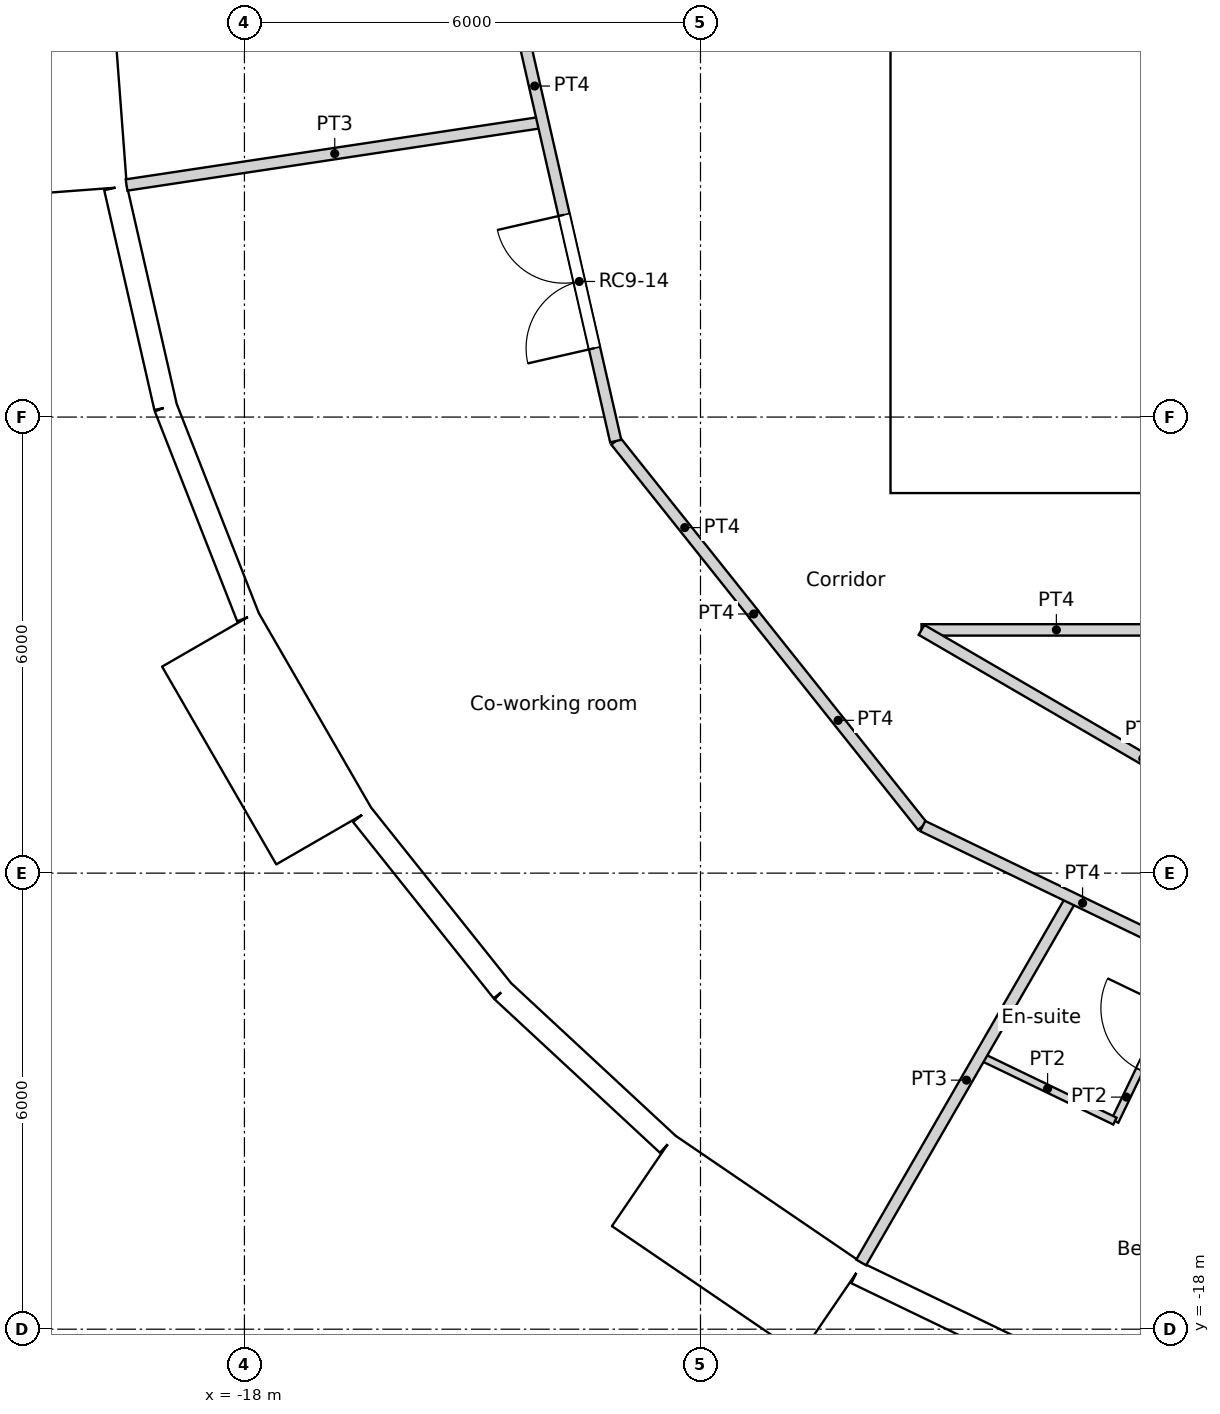
"""IFC4 building model, lengths in metres.
Left out: names, types, materials, properties, quantities, classifications, styles, units other than length and angle.
Written with IfcOpenShell. Run it as: python <this file> out.ifc"""

import sys

from ifc_helpers import new_model, si_unit, direction, frame, frame_2d, origin, origin_2d, place, context, subcontext, project, spatial, rectangle, circle, extrude, element, fill, save


model = new_model("IFC4")
c1 = context("Model", 3, precision=1e-05, world=origin(), true_north=direction((0.0, 1.0)))
c2 = subcontext(c1, "Body", "Model", "MODEL_VIEW")
j1 = project(units=[si_unit("LENGTHUNIT", "METRE"), si_unit("PLANEANGLEUNIT", "RADIAN")], contexts=[c1])
p1 = place(None, origin())
s1 = spatial("IfcSite", under=j1, at=p1, CompositionType="ELEMENT")
p2 = place(p1, origin())
s2 = spatial("IfcBuilding", under=s1, at=p2, CompositionType="ELEMENT")
p3 = place(p2, frame((0.0, 0.0, 316.2)))
s3 = spatial("IfcBuildingStorey", under=s2, at=p3, CompositionType="ELEMENT", Elevation=316.2)
for number, where, z_axis, x_axis in (
    (1, (-18.612, -2.805, 0.0), (0.0, 0.0, 1.0), (1.0, 0.0, 0.0)),
    (2, (-16.958, -8.167, 0.0), (0.0, 0.0, 1.0), (1.0, 0.0, 0.0)),
    (3, (-13.798, -12.802, 0.0), (0.0, 0.0, 1.0), (1.0, 0.0, 0.0)),
    (4, (-9.411, -16.301, 0.0), (0.0, 0.0, 1.0), (1.0, 0.0, 0.0)),
):
    element("IfcColumn", number, at=place(p3, frame(where, z_axis=z_axis, x_axis=x_axis)), inside=s3, PredefinedType="COLUMN", context=c2, shape_type="SweptSolid", body=[
        extrude(circle(Radius=0.45, at=origin_2d()), origin(), (0.0, 0.0, 1.0), 3.6),
    ])
p4 = place(p3, frame((-20.496, -0.032, -0.35), z_axis=(0.0, 0.0, 1.0), x_axis=(0.074785902127, -0.997199613339, 0.0)))
e5 = element("IfcWall", 5, at=p4, inside=s3, PredefinedType="ELEMENTEDWALL", context=c2, shape_type="SweptSolid", body=[
    extrude(rectangle(XDim=3.0, YDim=1.45, at=frame_2d((1.5, 0.0))), origin(), (0.0, 0.0, 1.0), 3.6),
])
p5 = place(p4, frame((1.5, 0.0, 1.9)))
e6 = element("IfcOpeningElement", 6, at=p5, cuts=e5, PredefinedType="OPENING", context=c2, shape_type="SweptSolid", body=[
    extrude(circle(Radius=0.9, at=origin_2d()), frame((0.0, 0.735, 0.0), z_axis=(0.0, -1.0, 0.0), x_axis=(1.0, 0.0, 0.0)), (0.0, 0.0, 1.0), 1.47),
])
p6 = place(p3, frame((-19.696, -2.984, 0.0), z_axis=(0.0, 0.0, 1.0), x_axis=(0.222529389789, -0.974925982155, 0.0)))
e7 = element("IfcWall", 7, at=p6, inside=s3, PredefinedType="SOLIDWALL", context=c2, shape_type="SweptSolid", body=[
    extrude(rectangle(XDim=2.962, YDim=0.3, at=frame_2d((1.481, 0.0))), origin(), (0.0, 0.0, 1.0), 3.25),
])
p7 = place(p6, frame((1.481, 0.0, 1.55)))
e8 = element("IfcOpeningElement", 8, at=p7, cuts=e7, PredefinedType="OPENING", context=c2, shape_type="SweptSolid", body=[
    extrude(circle(Radius=0.9, at=origin_2d()), frame((0.0, 0.16, 0.0), z_axis=(0.0, -1.0, 0.0), x_axis=(1.0, 0.0, 0.0)), (0.0, 0.0, 1.0), 0.32),
])
p8 = place(p3, frame((-19.037, -5.872, 0.0), z_axis=(0.0, 0.0, 1.0), x_axis=(0.36530043032, -0.930889679612, 0.0)))
e9 = element("IfcWall", 9, at=p8, inside=s3, PredefinedType="SOLIDWALL", context=c2, shape_type="SweptSolid", body=[
    extrude(rectangle(XDim=2.962, YDim=0.3, at=frame_2d((1.481, 0.0))), origin(), (0.0, 0.0, 1.0), 3.25),
])
p9 = place(p8, frame((1.481, 0.0, 1.55)))
e10 = element("IfcOpeningElement", 10, at=p9, cuts=e9, PredefinedType="OPENING", context=c2, shape_type="SweptSolid", body=[
    extrude(circle(Radius=0.9, at=origin_2d()), frame((0.0, 0.16, 0.0), z_axis=(0.0, -1.0, 0.0), x_axis=(1.0, 0.0, 0.0)), (0.0, 0.0, 1.0), 0.32),
])
p10 = place(p3, frame((-18.452, -8.921, -0.35), z_axis=(0.0, 0.0, 1.0), x_axis=(0.499990139034, -0.866031096941, 0.0)))
e11 = element("IfcWall", 11, at=p10, inside=s3, PredefinedType="ELEMENTEDWALL", context=c2, shape_type="SweptSolid", body=[
    extrude(rectangle(XDim=3.0, YDim=1.45, at=frame_2d((1.5, 0.0))), origin(), (0.0, 0.0, 1.0), 3.6),
])
p11 = place(p10, frame((1.5, 0.0, 1.9)))
e12 = element("IfcOpeningElement", 12, at=p11, cuts=e11, PredefinedType="OPENING", context=c2, shape_type="SweptSolid", body=[
    extrude(circle(Radius=0.9, at=origin_2d()), frame((0.0, 0.735, 0.0), z_axis=(0.0, -1.0, 0.0), x_axis=(1.0, 0.0, 0.0)), (0.0, 0.0, 1.0), 1.47),
])
p12 = place(p3, frame((-16.451, -11.234, 0.0), z_axis=(0.0, 0.0, 1.0), x_axis=(0.623498236992, -0.781824755599, 0.0)))
e13 = element("IfcWall", 13, at=p12, inside=s3, PredefinedType="SOLIDWALL", context=c2, shape_type="SweptSolid", body=[
    extrude(rectangle(XDim=2.962, YDim=0.3, at=frame_2d((1.481, 0.0))), origin(), (0.0, 0.0, 1.0), 3.25),
])
p13 = place(p12, frame((1.481, 0.0, 1.55)))
e14 = element("IfcOpeningElement", 14, at=p13, cuts=e13, PredefinedType="OPENING", context=c2, shape_type="SweptSolid", body=[
    extrude(circle(Radius=0.9, at=origin_2d()), frame((0.0, 0.16, 0.0), z_axis=(0.0, -1.0, 0.0), x_axis=(1.0, 0.0, 0.0)), (0.0, 0.0, 1.0), 0.32),
])
p14 = place(p3, frame((-14.604, -13.55, 0.0), z_axis=(0.0, 0.0, 1.0), x_axis=(0.733066412643, -0.680157066165, 0.0)))
e15 = element("IfcWall", 15, at=p14, inside=s3, PredefinedType="SOLIDWALL", context=c2, shape_type="SweptSolid", body=[
    extrude(rectangle(XDim=2.962, YDim=0.3, at=frame_2d((1.481, 0.0))), origin(), (0.0, 0.0, 1.0), 3.25),
])
p15 = place(p14, frame((1.481, 0.0, 1.55)))
e16 = element("IfcOpeningElement", 16, at=p15, cuts=e15, PredefinedType="OPENING", context=c2, shape_type="SweptSolid", body=[
    extrude(circle(Radius=0.9, at=origin_2d()), frame((0.0, 0.16, 0.0), z_axis=(0.0, -1.0, 0.0), x_axis=(1.0, 0.0, 0.0)), (0.0, 0.0, 1.0), 0.32),
])
p16 = place(p3, frame((-12.754, -16.044, -0.35), z_axis=(0.0, 0.0, 1.0), x_axis=(0.826246281157, -0.563309047392, 0.0)))
e17 = element("IfcWall", 17, at=p16, inside=s3, PredefinedType="ELEMENTEDWALL", context=c2, shape_type="SweptSolid", body=[
    extrude(rectangle(XDim=3.0, YDim=1.45, at=frame_2d((1.5, 0.0))), origin(), (0.0, 0.0, 1.0), 3.6),
])
p17 = place(p16, frame((1.5, 0.0, 1.9)))
e18 = element("IfcOpeningElement", 18, at=p17, cuts=e17, PredefinedType="OPENING", context=c2, shape_type="SweptSolid", body=[
    extrude(circle(Radius=0.9, at=origin_2d()), frame((0.0, 0.735, 0.0), z_axis=(0.0, -1.0, 0.0), x_axis=(1.0, 0.0, 0.0)), (0.0, 0.0, 1.0), 1.47),
])
p18 = place(p3, frame((-9.947, -17.259, 0.0), z_axis=(0.0, 0.0, 1.0), x_axis=(0.900939615635, -0.433944476838, 0.0)))
e19 = element("IfcWall", 19, at=p18, inside=s3, PredefinedType="SOLIDWALL", context=c2, shape_type="SweptSolid", body=[
    extrude(rectangle(XDim=2.962, YDim=0.3, at=frame_2d((1.481, 0.0))), origin(), (0.0, 0.0, 1.0), 3.25),
])
p19 = place(p18, frame((1.481, 0.0, 1.55)))
e20 = element("IfcOpeningElement", 20, at=p19, cuts=e19, PredefinedType="OPENING", context=c2, shape_type="SweptSolid", body=[
    extrude(circle(Radius=0.9, at=origin_2d()), frame((0.0, 0.16, 0.0), z_axis=(0.0, -1.0, 0.0), x_axis=(1.0, 0.0, 0.0)), (0.0, 0.0, 1.0), 0.32),
])
p20 = place(p3, frame((-9.5, -6.7, 0.0), z_axis=(0.0, 0.0, 1.0), x_axis=(1.0, 0.0, 0.0)))
e21 = element("IfcWall", 21, at=p20, inside=s3, PredefinedType="SOLIDWALL", context=c2, shape_type="SweptSolid", body=[
    extrude(rectangle(XDim=19.0, YDim=0.6, at=frame_2d((9.5, 0.0))), origin(), (0.0, 0.0, 1.0), 3.6),
])
p21 = place(p20, frame((10.4, 0.0, 0.0)))
e22 = element("IfcOpeningElement", 22, at=p21, cuts=e21, PredefinedType="OPENING", context=c2, shape_type="SweptSolid", body=[
    extrude(rectangle(XDim=1.0, YDim=2.1, at=frame_2d((0.5, 1.05))), frame((0.0, 0.3, 0.0), z_axis=(0.0, -1.0, 0.0), x_axis=(1.0, 0.0, 0.0)), (0.0, 0.0, 1.0), 0.6),
])
p22 = place(p20, frame((5.35, 0.0, 0.0)))
e23 = element("IfcOpeningElement", 23, at=p22, cuts=e21, PredefinedType="OPENING", context=c2, shape_type="SweptSolid", body=[
    extrude(rectangle(XDim=1.7, YDim=2.1, at=frame_2d((0.85, 1.05))), frame((0.0, 0.3, 0.0), z_axis=(0.0, -1.0, 0.0), x_axis=(1.0, 0.0, 0.0)), (0.0, 0.0, 1.0), 0.6),
])
p23 = place(p20, frame((11.95, 0.0, 0.0)))
e24 = element("IfcOpeningElement", 24, at=p23, cuts=e21, PredefinedType="OPENING", context=c2, shape_type="SweptSolid", body=[
    extrude(rectangle(XDim=1.7, YDim=2.1, at=frame_2d((0.85, 1.05))), frame((0.0, 0.3, 0.0), z_axis=(0.0, -1.0, 0.0), x_axis=(1.0, 0.0, 0.0)), (0.0, 0.0, 1.0), 0.6),
])
p24 = place(p3, frame((-9.2, -6.4, 0.0), z_axis=(0.0, 0.0, 1.0), x_axis=(0.0, 1.0, 0.0)))
e25 = element("IfcWall", 25, at=p24, inside=s3, PredefinedType="SOLIDWALL", context=c2, shape_type="SweptSolid", body=[
    extrude(rectangle(XDim=12.8, YDim=0.6, at=frame_2d((6.4, 0.0))), origin(), (0.0, 0.0, 1.0), 3.6),
])
p25 = place(p3, frame((-8.9, -3.1, 0.0), z_axis=(0.0, 0.0, 1.0), x_axis=(1.0, 0.0, 0.0)))
e26 = element("IfcWall", 26, at=p25, inside=s3, PredefinedType="SOLIDWALL", context=c2, shape_type="SweptSolid", body=[
    extrude(rectangle(XDim=9.6, YDim=0.3, at=frame_2d((4.8, 0.0))), origin(), (0.0, 0.0, 1.0), 3.25),
])
p26 = place(p25, frame((4.75, 0.0, 0.0)))
e27 = element("IfcOpeningElement", 27, at=p26, cuts=e26, PredefinedType="OPENING", context=c2, shape_type="SweptSolid", body=[
    extrude(rectangle(XDim=1.7, YDim=2.1, at=frame_2d((0.85, 1.05))), frame((0.0, 0.15, 0.0), z_axis=(0.0, -1.0, 0.0), x_axis=(1.0, 0.0, 0.0)), (0.0, 0.0, 1.0), 0.3),
])
p27 = place(p3, frame((-9.092, -8.8, 0.0), z_axis=(0.0, 0.0, 1.0), x_axis=(1.0, 0.0, 0.0)))
e28 = element("IfcWall", 28, at=p27, inside=s3, PredefinedType="PARTITIONING", context=c2, shape_type="SweptSolid", body=[
    extrude(rectangle(XDim=8.196, YDim=0.15, at=frame_2d((4.098, 0.0))), origin(), (0.0, 0.0, 1.0), 3.25),
])
p28 = place(p27, frame((3.598, 0.0, 0.0)))
e29 = element("IfcOpeningElement", 29, at=p28, cuts=e28, PredefinedType="OPENING", context=c2, shape_type="SweptSolid", body=[
    extrude(rectangle(XDim=1.0, YDim=2.04, at=frame_2d((0.5, 1.02))), frame((0.0, 0.075, 0.0), z_axis=(0.0, -1.0, 0.0), x_axis=(1.0, 0.0, 0.0)), (0.0, 0.0, 1.0), 0.15),
])
p29 = place(p3, frame((-9.092, -8.8, 0.0), z_axis=(0.0, 0.0, 1.0), x_axis=(0.864470922103, -0.502682827277, 0.0)))
e30 = element("IfcWall", 30, at=p29, inside=s3, PredefinedType="PARTITIONING", context=c2, shape_type="SweptSolid", body=[
    extrude(rectangle(XDim=6.735, YDim=0.15, at=frame_2d((3.368, 0.0))), origin(), (0.0, 0.0, 1.0), 3.25),
])
p30 = place(p3, frame((-11.3, -8.596, 0.0), z_axis=(0.0, 0.0, 1.0), x_axis=(0.623165080354, -0.782090328944, 0.0)))
e31 = element("IfcWall", 31, at=p30, inside=s3, PredefinedType="PARTITIONING", context=c2, shape_type="SweptSolid", body=[
    extrude(rectangle(XDim=3.564, YDim=0.15, at=frame_2d((1.782, 0.0))), origin(), (0.0, 0.0, 1.0), 3.25),
])
p31 = place(p3, frame((-11.3, -8.596, 0.0), z_axis=(0.0, 0.0, 1.0), x_axis=(0.0, 1.0, 0.0)))
e32 = element("IfcWall", 32, at=p31, inside=s3, PredefinedType="PARTITIONING", context=c2, shape_type="SweptSolid", body=[
    extrude(rectangle(XDim=0.011, YDim=0.15, at=frame_2d((0.006, 0.0))), origin(), (0.0, 0.0, 1.0), 3.25),
])
p32 = place(p3, frame((-14.557, 0.0, 0.0), z_axis=(0.0, 0.0, 1.0), x_axis=(0.222489165471, -0.974935162587, 0.0)))
e33 = element("IfcWall", 33, at=p32, inside=s3, PredefinedType="PARTITIONING", context=c2, shape_type="SweptSolid", body=[
    extrude(rectangle(XDim=6.479, YDim=0.15, at=frame_2d((3.239, 0.0))), origin(), (0.0, 0.0, 1.0), 3.25),
])
p33 = place(p32, frame((3.425, 0.0, 0.0)))
e34 = element("IfcOpeningElement", 34, at=p33, cuts=e33, PredefinedType="OPENING", context=c2, shape_type="SweptSolid", body=[
    extrude(rectangle(XDim=1.8, YDim=2.1, at=frame_2d((0.9, 1.05))), frame((0.0, 0.075, 0.0), z_axis=(0.0, -1.0, 0.0), x_axis=(1.0, 0.0, 0.0)), (0.0, 0.0, 1.0), 0.15),
])
p34 = place(p3, frame((-13.115, -6.316, 0.0), z_axis=(0.0, 0.0, 1.0), x_axis=(0.623446514299, -0.781866001185, 0.0)))
e35 = element("IfcWall", 35, at=p34, inside=s3, PredefinedType="PARTITIONING", context=c2, shape_type="SweptSolid", body=[
    extrude(rectangle(XDim=2.911, YDim=0.15, at=frame_2d((1.456, 0.0))), origin(), (0.0, 0.0, 1.0), 3.25),
])
p35 = place(p3, frame((-9.076, -11.381, 0.0), z_axis=(0.0, 0.0, 1.0), x_axis=(0.900851590682, -0.434127183629, 0.0)))
e36 = element("IfcWall", 36, at=p35, inside=s3, PredefinedType="PARTITIONING", context=c2, shape_type="SweptSolid", body=[
    extrude(rectangle(XDim=6.479, YDim=0.15, at=frame_2d((3.239, 0.0))), origin(), (0.0, 0.0, 1.0), 3.25),
])
p36 = place(p35, frame((4.719, 0.0, 0.0)))
e37 = element("IfcOpeningElement", 37, at=p36, cuts=e36, PredefinedType="OPENING", context=c2, shape_type="SweptSolid", body=[
    extrude(rectangle(XDim=1.0, YDim=2.1, at=frame_2d((0.5, 1.05))), frame((0.0, 0.075, 0.0), z_axis=(0.0, -1.0, 0.0), x_axis=(1.0, 0.0, 0.0)), (0.0, 0.0, 1.0), 0.15),
])
p37 = place(p3, frame((-19.551, -2.947, 0.0), z_axis=(0.0, 0.0, 1.0), x_axis=(0.988824228734, 0.149086031099, 0.0)))
e38 = element("IfcWall", 38, at=p37, inside=s3, PredefinedType="PARTITIONING", context=c2, shape_type="SweptSolid", body=[
    extrude(rectangle(XDim=5.54, YDim=0.15, at=frame_2d((2.77, 0.0))), origin(), (0.0, 0.0, 1.0), 3.25),
])
p38 = place(p3, frame((-9.886, -17.122, 0.0), z_axis=(0.0, 0.0, 1.0), x_axis=(0.500073446025, 0.865982995549, 0.0)))
e39 = element("IfcWall", 39, at=p38, inside=s3, PredefinedType="PARTITIONING", context=c2, shape_type="SweptSolid", body=[
    extrude(rectangle(XDim=5.539, YDim=0.15, at=frame_2d((2.77, 0.0))), origin(), (0.0, 0.0, 1.0), 3.25),
])
p39 = place(p3, frame((-8.319, -14.409, 0.0), z_axis=(0.0, 0.0, 1.0), x_axis=(0.900936932599, -0.433950047216, 0.0)))
e40 = element("IfcWall", 40, at=p39, inside=s3, PredefinedType="PARTITIONING", context=c2, shape_type="SweptSolid", body=[
    extrude(rectangle(XDim=1.966, YDim=0.1, at=frame_2d((0.983, 0.0))), origin(), (0.0, 0.0, 1.0), 3.25),
])
p40 = place(p3, frame((-6.548, -15.262, 0.0), z_axis=(0.0, 0.0, 1.0), x_axis=(0.433855388624, 0.900982520231, 0.0)))
e41 = element("IfcWall", 41, at=p40, inside=s3, PredefinedType="PARTITIONING", context=c2, shape_type="SweptSolid", body=[
    extrude(rectangle(XDim=2.399, YDim=0.1, at=frame_2d((1.2, 0.0))), origin(), (0.0, 0.0, 1.0), 3.25),
])
p41 = place(p40, frame((0.75, 0.0, 0.0)))
e42 = element("IfcOpeningElement", 42, at=p41, cuts=e41, PredefinedType="OPENING", context=c2, shape_type="SweptSolid", body=[
    extrude(rectangle(XDim=0.9, YDim=2.04, at=frame_2d((0.45, 1.02))), frame((0.0, 0.05, 0.0), z_axis=(0.0, -1.0, 0.0), x_axis=(1.0, 0.0, 0.0)), (0.0, 0.0, 1.0), 0.1),
])
p42 = place(p5, origin())
e43 = element("IfcWindow", 43, at=p42, inside=s3, PartitioningType="SINGLE_PANEL", PredefinedType="WINDOW", context=c2, shape_type="SweptSolid", body=[
    extrude(circle(Radius=0.9, at=origin_2d()), frame((0.0, 0.695, 0.0), z_axis=(0.0, -1.0, 0.0), x_axis=(1.0, 0.0, 0.0)), (0.0, 0.0, 1.0), 0.1),
])
fill(e6, e43)
p43 = place(p7, origin())
e44 = element("IfcWindow", 44, at=p43, inside=s3, PartitioningType="SINGLE_PANEL", PredefinedType="WINDOW", context=c2, shape_type="SweptSolid", body=[
    extrude(circle(Radius=0.9, at=origin_2d()), frame((0.0, 0.12, 0.0), z_axis=(0.0, -1.0, 0.0), x_axis=(1.0, 0.0, 0.0)), (0.0, 0.0, 1.0), 0.1),
])
fill(e8, e44)
p44 = place(p9, origin())
e45 = element("IfcWindow", 45, at=p44, inside=s3, PartitioningType="SINGLE_PANEL", PredefinedType="WINDOW", context=c2, shape_type="SweptSolid", body=[
    extrude(circle(Radius=0.9, at=origin_2d()), frame((0.0, 0.12, 0.0), z_axis=(0.0, -1.0, 0.0), x_axis=(1.0, 0.0, 0.0)), (0.0, 0.0, 1.0), 0.1),
])
fill(e10, e45)
p45 = place(p11, origin())
e46 = element("IfcWindow", 46, at=p45, inside=s3, PartitioningType="SINGLE_PANEL", PredefinedType="WINDOW", context=c2, shape_type="SweptSolid", body=[
    extrude(circle(Radius=0.9, at=origin_2d()), frame((0.0, 0.695, 0.0), z_axis=(0.0, -1.0, 0.0), x_axis=(1.0, 0.0, 0.0)), (0.0, 0.0, 1.0), 0.1),
])
fill(e12, e46)
p46 = place(p13, origin())
e47 = element("IfcWindow", 47, at=p46, inside=s3, PartitioningType="SINGLE_PANEL", PredefinedType="WINDOW", context=c2, shape_type="SweptSolid", body=[
    extrude(circle(Radius=0.9, at=origin_2d()), frame((0.0, 0.12, 0.0), z_axis=(0.0, -1.0, 0.0), x_axis=(1.0, 0.0, 0.0)), (0.0, 0.0, 1.0), 0.1),
])
fill(e14, e47)
p47 = place(p15, origin())
e48 = element("IfcWindow", 48, at=p47, inside=s3, PartitioningType="SINGLE_PANEL", PredefinedType="WINDOW", context=c2, shape_type="SweptSolid", body=[
    extrude(circle(Radius=0.9, at=origin_2d()), frame((0.0, 0.12, 0.0), z_axis=(0.0, -1.0, 0.0), x_axis=(1.0, 0.0, 0.0)), (0.0, 0.0, 1.0), 0.1),
])
fill(e16, e48)
p48 = place(p17, origin())
e49 = element("IfcWindow", 49, at=p48, inside=s3, PartitioningType="SINGLE_PANEL", PredefinedType="WINDOW", context=c2, shape_type="SweptSolid", body=[
    extrude(circle(Radius=0.9, at=origin_2d()), frame((0.0, 0.695, 0.0), z_axis=(0.0, -1.0, 0.0), x_axis=(1.0, 0.0, 0.0)), (0.0, 0.0, 1.0), 0.1),
])
fill(e18, e49)
p49 = place(p19, origin())
e50 = element("IfcWindow", 50, at=p49, inside=s3, PartitioningType="SINGLE_PANEL", PredefinedType="WINDOW", context=c2, shape_type="SweptSolid", body=[
    extrude(circle(Radius=0.9, at=origin_2d()), frame((0.0, 0.12, 0.0), z_axis=(0.0, -1.0, 0.0), x_axis=(1.0, 0.0, 0.0)), (0.0, 0.0, 1.0), 0.1),
])
fill(e20, e50)
p50 = place(p33, origin())
e51 = element("IfcDoor", 51, at=p50, inside=s3, OperationType="DOUBLE_DOOR_SINGLE_SWING", PredefinedType="DOOR", context=c2, shape_type="SweptSolid", body=[
    extrude(rectangle(XDim=1.8, YDim=2.1, at=frame_2d((0.9, 1.05))), frame((0.0, 0.025, 0.0), z_axis=(0.0, -1.0, 0.0), x_axis=(1.0, 0.0, 0.0)), (0.0, 0.0, 1.0), 0.05),
])
fill(e34, e51)
p51 = place(p41, origin())
e52 = element("IfcDoor", 52, at=p51, inside=s3, OperationType="SINGLE_SWING_RIGHT", PredefinedType="DOOR", context=c2, shape_type="SweptSolid", body=[
    extrude(rectangle(XDim=0.9, YDim=2.04, at=frame_2d((0.45, 1.02))), frame((0.0, 0.025, 0.0), z_axis=(0.0, -1.0, 0.0), x_axis=(1.0, 0.0, 0.0)), (0.0, 0.0, 1.0), 0.05),
])
fill(e42, e52)
save(model, sys.argv[1])
